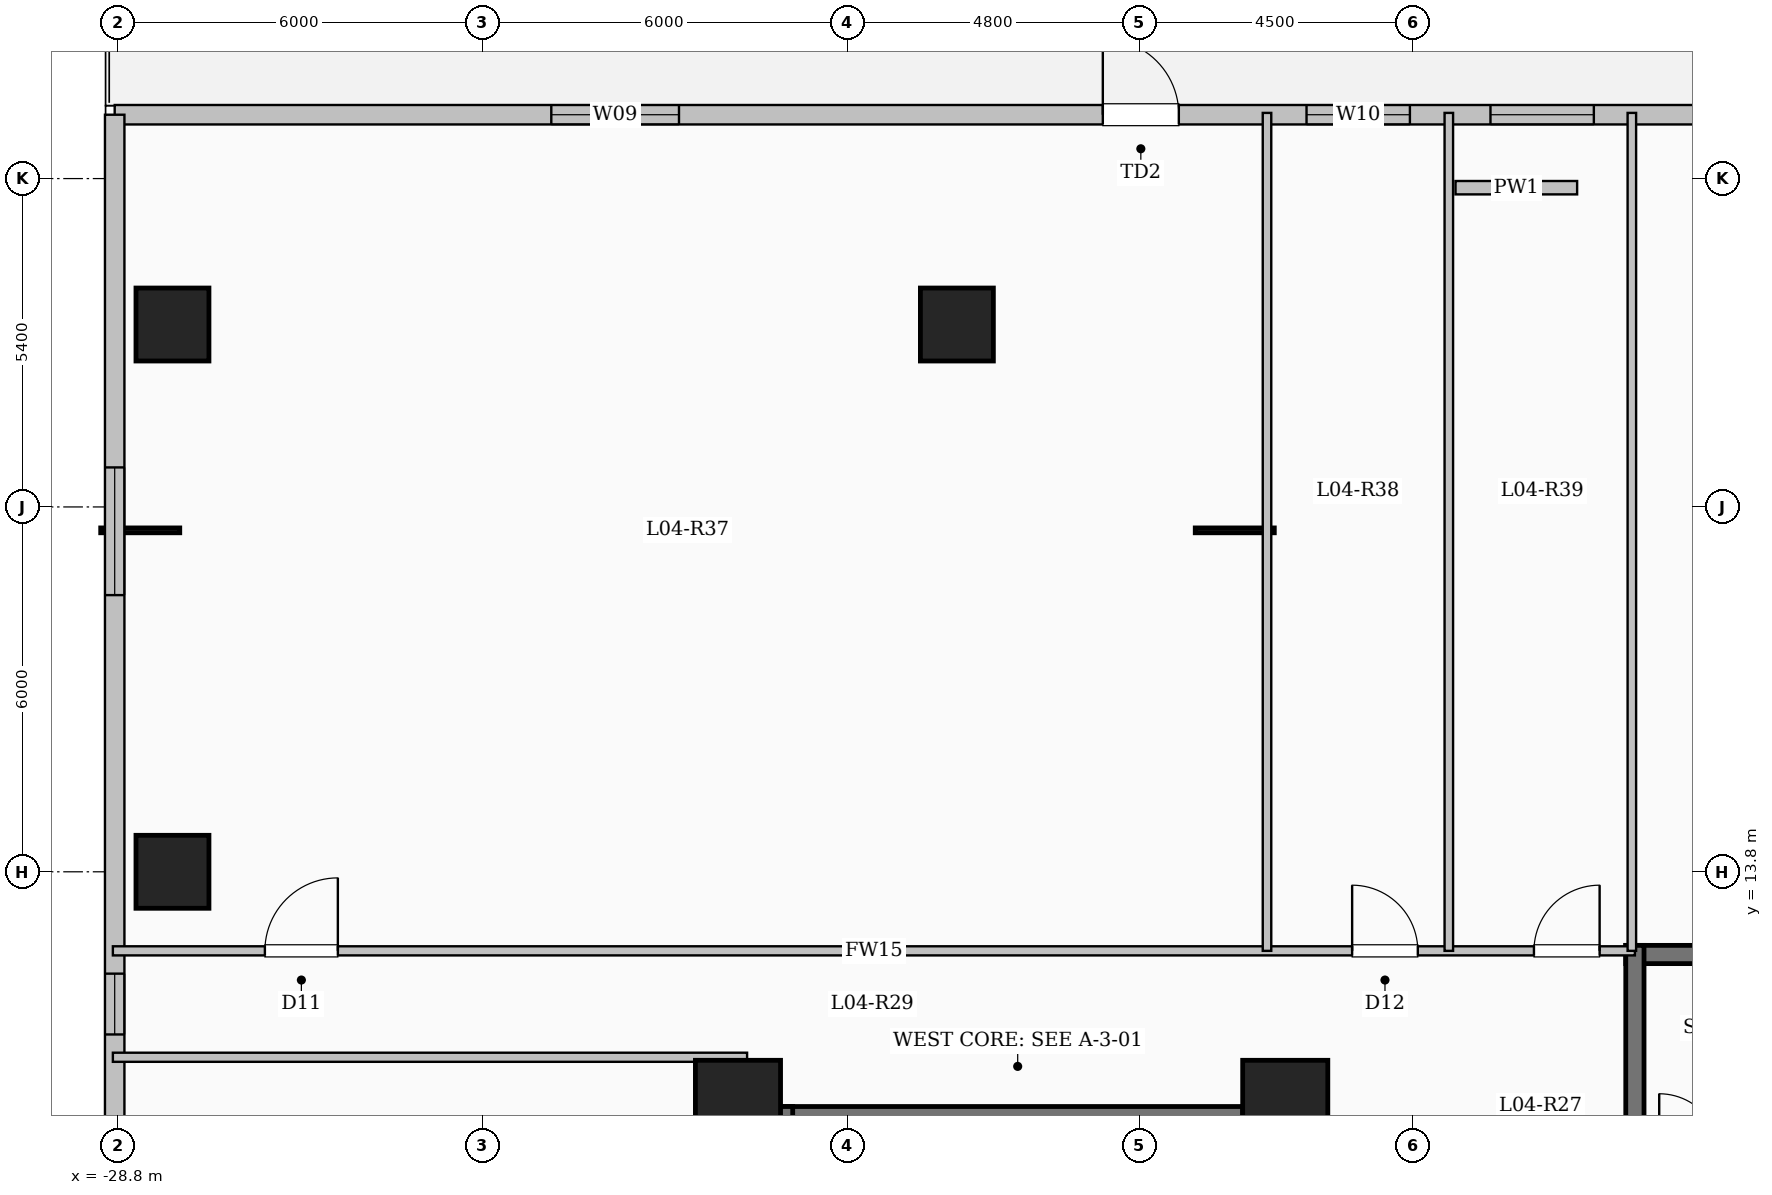
"""IFC4 building model, lengths in metres.
Left out: names, types, materials, properties, quantities, classifications, styles, units other than length and angle.
Written with IfcOpenShell. Run it as: python <this file> out.ifc"""

import sys

from ifc_helpers import new_model, si_unit, direction, frame, frame_2d, origin, origin_2d, place, context, subcontext, project, spatial, rectangle, extrude, element, fill, save


model = new_model("IFC4")
c1 = context("Model", 3, precision=1e-05, world=origin(), true_north=direction((0.0, 1.0)))
c2 = subcontext(c1, "Body", "Model", "MODEL_VIEW")
j1 = project(units=[si_unit("LENGTHUNIT", "METRE"), si_unit("PLANEANGLEUNIT", "RADIAN")], contexts=[c1])
p1 = place(None, origin())
s1 = spatial("IfcSite", under=j1, at=p1, CompositionType="ELEMENT")
p2 = place(p1, origin())
s2 = spatial("IfcBuilding", under=s1, at=p2, CompositionType="ELEMENT")
p3 = place(p2, frame((0.0, 0.0, 18.9)))
s3 = spatial("IfcBuildingStorey", under=s2, at=p3, CompositionType="ELEMENT", Elevation=18.9)
for number, where, z_axis, x_axis in (
    (1, (-9.6, 10.0, 0.0), (0.0, 0.0, 1.0), (1.0, 0.0, 0.0)),
    (2, (-18.6, 10.0, 0.0), (0.0, 0.0, 1.0), (1.0, 0.0, 0.0)),
):
    element("IfcColumn", number, at=place(p3, frame(where, z_axis=z_axis, x_axis=x_axis)), inside=s3, PredefinedType="COLUMN", context=c2, shape_type="SweptSolid", body=[
        extrude(rectangle(XDim=1.4, YDim=1.4, at=origin_2d()), origin(), (0.0, 0.0, 1.0), 5.1),
    ])
for number, where, z_axis, x_axis in (
    (3, (-27.9, 22.8, 0.0), (0.0, 0.0, 1.0), (1.0, 0.0, 0.0)),
    (4, (-15.0, 22.8, 0.0), (0.0, 0.0, 1.0), (1.0, 0.0, 0.0)),
    (5, (-27.9, 13.8, 0.0), (0.0, 0.0, 1.0), (1.0, 0.0, 0.0)),
):
    element("IfcColumn", number, at=place(p3, frame(where, z_axis=z_axis, x_axis=x_axis)), inside=s3, PredefinedType="COLUMN", context=c2, shape_type="SweptSolid", body=[
        extrude(rectangle(XDim=1.2, YDim=1.2, at=origin_2d()), origin(), (0.0, 0.0, 1.0), 5.1),
    ])
p4 = place(p3, frame((-28.85, 26.25, 0.0), z_axis=(0.0, 0.0, 1.0), x_axis=(1.0, 0.0, 0.0)))
e6 = element("IfcWall", 6, at=p4, inside=s3, PredefinedType="SOLIDWALL", context=c2, shape_type="SweptSolid", body=[
    extrude(rectangle(XDim=57.7, YDim=0.32, at=frame_2d((28.85, 0.0))), origin(), (0.0, 0.0, 1.0), 4.85),
])
p5 = place(p4, frame((16.25, 0.0, 0.0)))
e7 = element("IfcOpeningElement", 7, at=p5, cuts=e6, PredefinedType="OPENING", context=c2, shape_type="SweptSolid", body=[
    extrude(rectangle(XDim=1.25, YDim=2.25, at=frame_2d((0.625, 1.125))), frame((0.0, 0.17, 0.0), z_axis=(0.0, -1.0, 0.0), x_axis=(1.0, 0.0, 0.0)), (0.0, 0.0, 1.0), 0.34),
])
p6 = place(p4, frame((7.18, 0.0, 0.9)))
e8 = element("IfcOpeningElement", 8, at=p6, cuts=e6, PredefinedType="OPENING", context=c2, shape_type="SweptSolid", body=[
    extrude(rectangle(XDim=2.1, YDim=2.0, at=frame_2d((1.05, 1.0))), frame((0.0, 0.17, 0.0), z_axis=(0.0, -1.0, 0.0), x_axis=(1.0, 0.0, 0.0)), (0.0, 0.0, 1.0), 0.34),
])
p7 = place(p4, frame((19.6, 0.0, 0.9)))
e9 = element("IfcOpeningElement", 9, at=p7, cuts=e6, PredefinedType="OPENING", context=c2, shape_type="SweptSolid", body=[
    extrude(rectangle(XDim=1.7, YDim=1.9, at=frame_2d((0.85, 0.95))), frame((0.0, 0.17, 0.0), z_axis=(0.0, -1.0, 0.0), x_axis=(1.0, 0.0, 0.0)), (0.0, 0.0, 1.0), 0.34),
])
p8 = place(p4, frame((22.625, 0.0, 0.9)))
e10 = element("IfcOpeningElement", 10, at=p8, cuts=e6, PredefinedType="OPENING", context=c2, shape_type="SweptSolid", body=[
    extrude(rectangle(XDim=1.7, YDim=1.9, at=frame_2d((0.85, 0.95))), frame((0.0, 0.17, 0.0), z_axis=(0.0, -1.0, 0.0), x_axis=(1.0, 0.0, 0.0)), (0.0, 0.0, 1.0), 0.34),
])
p9 = place(p4, frame((44.2, 0.0, 0.9)))
e11 = element("IfcOpeningElement", 11, at=p9, cuts=e6, PredefinedType="OPENING", context=c2, shape_type="SweptSolid", body=[
    extrude(rectangle(XDim=2.1, YDim=2.0, at=frame_2d((1.05, 1.0))), frame((0.0, 0.17, 0.0), z_axis=(0.0, -1.0, 0.0), x_axis=(1.0, 0.0, 0.0)), (0.0, 0.0, 1.0), 0.34),
])
p10 = place(p4, frame((50.925, 0.0, 0.9)))
e12 = element("IfcOpeningElement", 12, at=p10, cuts=e6, PredefinedType="OPENING", context=c2, shape_type="SweptSolid", body=[
    extrude(rectangle(XDim=2.1, YDim=2.0, at=frame_2d((1.05, 1.0))), frame((0.0, 0.17, 0.0), z_axis=(0.0, -1.0, 0.0), x_axis=(1.0, 0.0, 0.0)), (0.0, 0.0, 1.0), 0.34),
])
p11 = place(p4, frame((54.8, 0.0, 0.9)))
e13 = element("IfcOpeningElement", 13, at=p11, cuts=e6, PredefinedType="OPENING", context=c2, shape_type="SweptSolid", body=[
    extrude(rectangle(XDim=2.1, YDim=2.0, at=frame_2d((1.05, 1.0))), frame((0.0, 0.17, 0.0), z_axis=(0.0, -1.0, 0.0), x_axis=(1.0, 0.0, 0.0)), (0.0, 0.0, 1.0), 0.34),
])
p12 = place(p3, frame((-28.85, -26.25, 0.0), z_axis=(0.0, 0.0, 1.0), x_axis=(0.0, 1.0, 0.0)))
e14 = element("IfcWall", 14, at=p12, inside=s3, PredefinedType="SOLIDWALL", context=c2, shape_type="SweptSolid", body=[
    extrude(rectangle(XDim=52.5, YDim=0.32, at=frame_2d((26.25, 0.0))), origin(), (0.0, 0.0, 1.0), 4.85),
])
p13 = place(p12, frame((6.85, 0.0, 0.9)))
e15 = element("IfcOpeningElement", 15, at=p13, cuts=e14, PredefinedType="OPENING", context=c2, shape_type="SweptSolid", body=[
    extrude(rectangle(XDim=2.1, YDim=2.0, at=frame_2d((1.05, 1.0))), frame((0.0, 0.17, 0.0), z_axis=(0.0, -1.0, 0.0), x_axis=(1.0, 0.0, 0.0)), (0.0, 0.0, 1.0), 0.34),
])
p14 = place(p12, frame((16.643, 0.0, 0.9)))
e16 = element("IfcOpeningElement", 16, at=p14, cuts=e14, PredefinedType="OPENING", context=c2, shape_type="SweptSolid", body=[
    extrude(rectangle(XDim=1.7, YDim=1.9, at=frame_2d((0.85, 0.95))), frame((0.0, 0.17, 0.0), z_axis=(0.0, -1.0, 0.0), x_axis=(1.0, 0.0, 0.0)), (0.0, 0.0, 1.0), 0.34),
])
p15 = place(p12, frame((26.95, 0.0, 0.9)))
e17 = element("IfcOpeningElement", 17, at=p15, cuts=e14, PredefinedType="OPENING", context=c2, shape_type="SweptSolid", body=[
    extrude(rectangle(XDim=2.1, YDim=2.0, at=frame_2d((1.05, 1.0))), frame((0.0, 0.17, 0.0), z_axis=(0.0, -1.0, 0.0), x_axis=(1.0, 0.0, 0.0)), (0.0, 0.0, 1.0), 0.34),
])
p16 = place(p12, frame((37.375, 0.0, 0.95)))
e18 = element("IfcOpeningElement", 18, at=p16, cuts=e14, PredefinedType="OPENING", context=c2, shape_type="SweptSolid", body=[
    extrude(rectangle(XDim=1.0, YDim=1.5, at=frame_2d((0.5, 0.75))), frame((0.0, 0.17, 0.0), z_axis=(0.0, -1.0, 0.0), x_axis=(1.0, 0.0, 0.0)), (0.0, 0.0, 1.0), 0.34),
])
p17 = place(p12, frame((44.6, 0.0, 0.9)))
e19 = element("IfcOpeningElement", 19, at=p17, cuts=e14, PredefinedType="OPENING", context=c2, shape_type="SweptSolid", body=[
    extrude(rectangle(XDim=2.1, YDim=2.0, at=frame_2d((1.05, 1.0))), frame((0.0, 0.17, 0.0), z_axis=(0.0, -1.0, 0.0), x_axis=(1.0, 0.0, 0.0)), (0.0, 0.0, 1.0), 0.34),
])
p18 = place(p3, frame((-6.8, 25.05, 0.0), z_axis=(0.0, 0.0, 1.0), x_axis=(1.0, 0.0, 0.0)))
e20 = element("IfcWall", 20, at=p18, inside=s3, PredefinedType="PARAPET", context=c2, shape_type="SweptSolid", body=[
    extrude(rectangle(XDim=2.0, YDim=0.22, at=frame_2d((1.0, 0.0))), origin(), (0.0, 0.0, 1.0), 0.85),
])
p19 = place(p3, frame((-18.0, 9.79, 0.0), z_axis=(0.0, 0.0, 1.0), x_axis=(1.0, 0.0, 0.0)))
e21 = element("IfcWall", 21, at=p19, inside=s3, PredefinedType="SHEAR", context=c2, shape_type="SweptSolid", body=[
    extrude(rectangle(XDim=8.0, YDim=0.3, at=frame_2d((4.0, 0.0))), origin(), (0.0, 0.0, 1.0), 5.1),
])
for number, where, z_axis, x_axis in (
    (22, (-17.85, 6.35, 0.0), (0.0, 0.0, 1.0), (0.0, 1.0, 0.0)),
    (23, (-10.15, 6.35, 0.0), (0.0, 0.0, 1.0), (0.0, 1.0, 0.0)),
):
    element("IfcWall", number, at=place(p3, frame(where, z_axis=z_axis, x_axis=x_axis)), inside=s3, PredefinedType="SHEAR", context=c2, shape_type="SweptSolid", body=[
        extrude(rectangle(XDim=3.59, YDim=0.3, at=frame_2d((1.795, 0.0))), origin(), (0.0, 0.0, 1.0), 5.1),
    ])
p20 = place(p3, frame((-4.0, 12.44, 0.0), z_axis=(0.0, 0.0, 1.0), x_axis=(1.0, 0.0, 0.0)))
e24 = element("IfcWall", 24, at=p20, inside=s3, PredefinedType="SHEAR", context=c2, shape_type="SweptSolid", body=[
    extrude(rectangle(XDim=8.0, YDim=0.3, at=frame_2d((4.0, 0.0))), origin(), (0.0, 0.0, 1.0), 5.1),
])
p21 = place(p3, frame((-3.85, 9.0, 0.0), z_axis=(0.0, 0.0, 1.0), x_axis=(0.0, 1.0, 0.0)))
e25 = element("IfcWall", 25, at=p21, inside=s3, PredefinedType="SHEAR", context=c2, shape_type="SweptSolid", body=[
    extrude(rectangle(XDim=3.59, YDim=0.3, at=frame_2d((1.795, 0.0))), origin(), (0.0, 0.0, 1.0), 5.1),
])
p22 = place(p3, frame((-28.88, 12.5, 0.0), z_axis=(0.0, 0.0, 1.0), x_axis=(1.0, 0.0, 0.0)))
e26 = element("IfcWall", 26, at=p22, inside=s3, PredefinedType="PARTITIONING", context=c2, shape_type="SweptSolid", body=[
    extrude(rectangle(XDim=25.03, YDim=0.15, at=frame_2d((12.515, 0.0))), origin(), (0.0, 0.0, 1.0), 4.85),
])
p23 = place(p22, frame((2.5, 0.0, 0.0)))
e27 = element("IfcOpeningElement", 27, at=p23, cuts=e26, PredefinedType="OPENING", context=c2, shape_type="SweptSolid", body=[
    extrude(rectangle(XDim=1.2, YDim=2.15, at=frame_2d((0.6, 1.075))), frame((0.0, 0.085, 0.0), z_axis=(0.0, -1.0, 0.0), x_axis=(1.0, 0.0, 0.0)), (0.0, 0.0, 1.0), 0.17),
])
p24 = place(p22, frame((20.38, 0.0, 0.0)))
e28 = element("IfcOpeningElement", 28, at=p24, cuts=e26, PredefinedType="OPENING", context=c2, shape_type="SweptSolid", body=[
    extrude(rectangle(XDim=1.08, YDim=2.15, at=frame_2d((0.54, 1.075))), frame((0.0, 0.085, 0.0), z_axis=(0.0, -1.0, 0.0), x_axis=(1.0, 0.0, 0.0)), (0.0, 0.0, 1.0), 0.17),
])
p25 = place(p22, frame((23.37, 0.0, 0.0)))
e29 = element("IfcOpeningElement", 29, at=p25, cuts=e26, PredefinedType="OPENING", context=c2, shape_type="SweptSolid", body=[
    extrude(rectangle(XDim=1.08, YDim=2.15, at=frame_2d((0.54, 1.075))), frame((0.0, 0.085, 0.0), z_axis=(0.0, -1.0, 0.0), x_axis=(1.0, 0.0, 0.0)), (0.0, 0.0, 1.0), 0.17),
])
for number, where, z_axis, x_axis in (
    (30, (-3.9, 12.5, 0.0), (0.0, 0.0, 1.0), (0.0, 1.0, 0.0)),
    (31, (-9.9, 12.5, 0.0), (0.0, 0.0, 1.0), (0.0, 1.0, 0.0)),
    (32, (-6.91, 12.5, 0.0), (0.0, 0.0, 1.0), (0.0, 1.0, 0.0)),
):
    element("IfcWall", number, at=place(p3, frame(where, z_axis=z_axis, x_axis=x_axis)), inside=s3, PredefinedType="PARTITIONING", context=c2, shape_type="SweptSolid", body=[
        extrude(rectangle(XDim=13.78, YDim=0.14, at=frame_2d((6.89, 0.0))), origin(), (0.0, 0.0, 1.0), 4.85),
    ])
p26 = place(p3, frame((-28.88, 10.75, 0.0), z_axis=(0.0, 0.0, 1.0), x_axis=(1.0, 0.0, 0.0)))
e33 = element("IfcWall", 33, at=p26, inside=s3, PredefinedType="PARTITIONING", context=c2, shape_type="SweptSolid", body=[
    extrude(rectangle(XDim=10.43, YDim=0.15, at=frame_2d((5.215, 0.0))), origin(), (0.0, 0.0, 1.0), 4.85),
])
p27 = place(p5, origin())
e34 = element("IfcDoor", 34, at=p27, inside=s3, OperationType="SINGLE_SWING_LEFT", PredefinedType="DOOR", context=c2, shape_type="SweptSolid", body=[
    extrude(rectangle(XDim=1.25, YDim=2.25, at=frame_2d((0.625, 1.125))), frame((0.0, 0.025, 0.0), z_axis=(0.0, -1.0, 0.0), x_axis=(1.0, 0.0, 0.0)), (0.0, 0.0, 1.0), 0.05),
])
fill(e7, e34)
p28 = place(p6, origin())
e35 = element("IfcWindow", 35, at=p28, inside=s3, PartitioningType="SINGLE_PANEL", PredefinedType="WINDOW", context=c2, shape_type="SweptSolid", body=[
    extrude(rectangle(XDim=2.1, YDim=2.0, at=frame_2d((1.05, 1.0))), frame((0.0, 0.03, 0.0), z_axis=(0.0, -1.0, 0.0), x_axis=(1.0, 0.0, 0.0)), (0.0, 0.0, 1.0), 0.06),
])
fill(e8, e35)
p29 = place(p7, origin())
e36 = element("IfcWindow", 36, at=p29, inside=s3, PartitioningType="SINGLE_PANEL", PredefinedType="WINDOW", context=c2, shape_type="SweptSolid", body=[
    extrude(rectangle(XDim=1.7, YDim=1.9, at=frame_2d((0.85, 0.95))), frame((0.0, 0.03, 0.0), z_axis=(0.0, -1.0, 0.0), x_axis=(1.0, 0.0, 0.0)), (0.0, 0.0, 1.0), 0.06),
])
fill(e9, e36)
p30 = place(p8, origin())
e37 = element("IfcWindow", 37, at=p30, inside=s3, PartitioningType="SINGLE_PANEL", PredefinedType="WINDOW", context=c2, shape_type="SweptSolid", body=[
    extrude(rectangle(XDim=1.7, YDim=1.9, at=frame_2d((0.85, 0.95))), frame((0.0, 0.03, 0.0), z_axis=(0.0, -1.0, 0.0), x_axis=(1.0, 0.0, 0.0)), (0.0, 0.0, 1.0), 0.06),
])
fill(e10, e37)
p31 = place(p16, origin())
e38 = element("IfcWindow", 38, at=p31, inside=s3, PartitioningType="SINGLE_PANEL", PredefinedType="WINDOW", context=c2, shape_type="SweptSolid", body=[
    extrude(rectangle(XDim=1.0, YDim=1.5, at=frame_2d((0.5, 0.75))), frame((0.0, 0.03, 0.0), z_axis=(0.0, -1.0, 0.0), x_axis=(1.0, 0.0, 0.0)), (0.0, 0.0, 1.0), 0.06),
])
fill(e18, e38)
p32 = place(p17, origin())
e39 = element("IfcWindow", 39, at=p32, inside=s3, PartitioningType="SINGLE_PANEL", PredefinedType="WINDOW", context=c2, shape_type="SweptSolid", body=[
    extrude(rectangle(XDim=2.1, YDim=2.0, at=frame_2d((1.05, 1.0))), frame((0.0, 0.03, 0.0), z_axis=(0.0, -1.0, 0.0), x_axis=(1.0, 0.0, 0.0)), (0.0, 0.0, 1.0), 0.06),
])
fill(e19, e39)
p33 = place(p23, origin())
e40 = element("IfcDoor", 40, at=p33, inside=s3, OperationType="SINGLE_SWING_RIGHT", PredefinedType="DOOR", context=c2, shape_type="SweptSolid", body=[
    extrude(rectangle(XDim=1.2, YDim=2.15, at=frame_2d((0.6, 1.075))), frame((0.0, 0.025, 0.0), z_axis=(0.0, -1.0, 0.0), x_axis=(1.0, 0.0, 0.0)), (0.0, 0.0, 1.0), 0.05),
])
fill(e27, e40)
p34 = place(p24, origin())
e41 = element("IfcDoor", 41, at=p34, inside=s3, OperationType="SINGLE_SWING_LEFT", PredefinedType="DOOR", context=c2, shape_type="SweptSolid", body=[
    extrude(rectangle(XDim=1.08, YDim=2.15, at=frame_2d((0.54, 1.075))), frame((0.0, 0.025, 0.0), z_axis=(0.0, -1.0, 0.0), x_axis=(1.0, 0.0, 0.0)), (0.0, 0.0, 1.0), 0.05),
])
fill(e28, e41)
p35 = place(p25, origin())
e42 = element("IfcDoor", 42, at=p35, inside=s3, OperationType="SINGLE_SWING_RIGHT", PredefinedType="DOOR", context=c2, shape_type="SweptSolid", body=[
    extrude(rectangle(XDim=1.08, YDim=2.15, at=frame_2d((0.54, 1.075))), frame((0.0, 0.025, 0.0), z_axis=(0.0, -1.0, 0.0), x_axis=(1.0, 0.0, 0.0)), (0.0, 0.0, 1.0), 0.05),
])
fill(e29, e42)
save(model, sys.argv[1])
